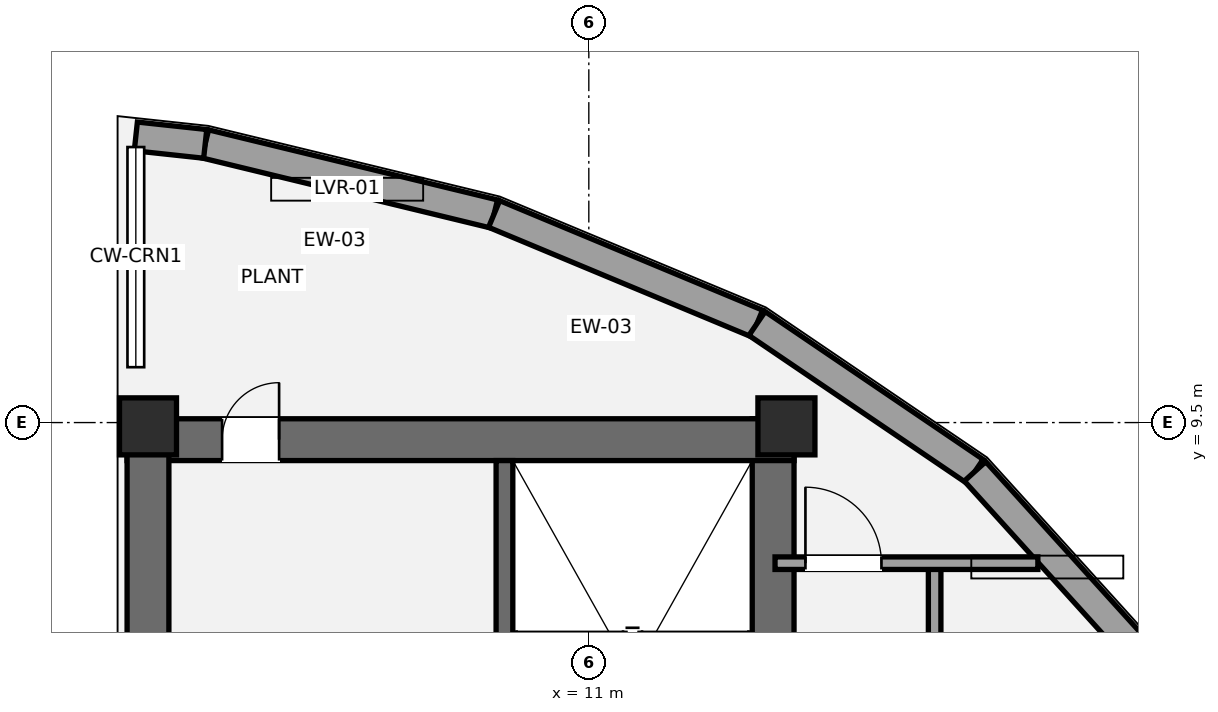
"""IFC4 building model, lengths in metres.
Left out: names, types, materials, properties, quantities, classifications, styles, units other than length and angle.
Written with IfcOpenShell. Run it as: python <this file> out.ifc"""

import sys

from ifc_helpers import new_model, si_unit, direction, frame, frame_2d, origin, origin_2d, place, context, subcontext, project, spatial, rectangle, extrude, element, fill, save


model = new_model("IFC4")
c1 = context("Model", 3, precision=1e-05, world=origin(), true_north=direction((0.0, 1.0)))
c2 = subcontext(c1, "Body", "Model", "MODEL_VIEW")
j1 = project(units=[si_unit("LENGTHUNIT", "METRE"), si_unit("PLANEANGLEUNIT", "RADIAN")], contexts=[c1])
p1 = place(None, origin())
s1 = spatial("IfcSite", under=j1, at=p1, CompositionType="ELEMENT")
p2 = place(p1, origin())
s2 = spatial("IfcBuilding", under=s1, at=p2, CompositionType="ELEMENT")
p3 = place(p2, frame((0.0, 0.0, 280.6)))
s3 = spatial("IfcBuildingStorey", under=s2, at=p3, CompositionType="ELEMENT", Elevation=280.6)
p4 = place(p3, frame((13.425, 1.3, 0.0), z_axis=(0.0, 0.0, 1.0), x_axis=(0.0, 1.0, 0.0)))
e1 = element("IfcWall", 1, at=p4, inside=s3, PredefinedType="SHEAR", context=c2, shape_type="SweptSolid", body=[
    extrude(rectangle(XDim=8.25, YDim=0.55, at=frame_2d((4.125, 0.0))), origin(), (0.0, 0.0, 1.0), 3.8),
])
p5 = place(p3, frame((4.925, 9.275, 0.0), z_axis=(0.0, 0.0, 1.0), x_axis=(1.0, 0.0, 0.0)))
e2 = element("IfcWall", 2, at=p5, inside=s3, PredefinedType="SHEAR", context=c2, shape_type="SweptSolid", body=[
    extrude(rectangle(XDim=8.775, YDim=0.55, at=frame_2d((4.387, 0.0))), origin(), (0.0, 0.0, 1.0), 3.8),
])
p6 = place(p5, frame((1.25, 0.0, 0.0)))
e3 = element("IfcOpeningElement", 3, at=p6, cuts=e2, PredefinedType="OPENING", context=c2, shape_type="SweptSolid", body=[
    extrude(rectangle(XDim=0.75, YDim=2.1, at=frame_2d((0.375, 1.05))), frame((0.0, 0.285, 0.0), z_axis=(0.0, -1.0, 0.0), x_axis=(1.0, 0.0, 0.0)), (0.0, 0.0, 1.0), 0.57),
])
p7 = place(p3, frame((5.2, 1.3, 0.0), z_axis=(0.0, 0.0, 1.0), x_axis=(0.0, 1.0, 0.0)))
e4 = element("IfcWall", 4, at=p7, inside=s3, PredefinedType="SHEAR", context=c2, shape_type="SweptSolid", body=[
    extrude(rectangle(XDim=8.25, YDim=0.55, at=frame_2d((4.125, 0.0))), origin(), (0.0, 0.0, 1.0), 3.8),
])
p8 = place(p3, frame((9.89, 1.85, 0.0), z_axis=(0.0, 0.0, 1.0), x_axis=(0.0, 1.0, 0.0)))
e5 = element("IfcWall", 5, at=p8, inside=s3, PredefinedType="SHEAR", context=c2, shape_type="SweptSolid", body=[
    extrude(rectangle(XDim=7.15, YDim=0.22, at=frame_2d((3.575, 0.0))), origin(), (0.0, 0.0, 1.0), 3.8),
])
for number, where, z_axis, x_axis in (
    (6, (5.2, 9.45, 0.0), (0.0, 0.0, 1.0), (1.0, 0.0, 0.0)),
    (7, (13.6, 9.45, 0.0), (0.0, 0.0, 1.0), (1.0, 0.0, 0.0)),
):
    element("IfcColumn", number, at=place(p3, frame(where, z_axis=z_axis, x_axis=x_axis)), inside=s3, PredefinedType="PILASTER", context=c2, shape_type="SweptSolid", body=[
        extrude(rectangle(XDim=0.75, YDim=0.75, at=origin_2d()), origin(), (0.0, 0.0, 1.0), 3.8),
    ])
p9 = place(p3, frame((9.754, 12.245, 0.0), z_axis=(0.0, 0.0, 1.0), x_axis=(-0.971829314356, 0.235685773347, 0.0)))
e8 = element("IfcWall", 8, at=p9, inside=s3, PredefinedType="ELEMENTEDWALL", context=c2, shape_type="SweptSolid", body=[
    extrude(rectangle(XDim=3.911, YDim=0.38, at=frame_2d((1.956, 0.0))), origin(), (0.0, 0.0, 1.0), 2.97),
])
p10 = place(p3, frame((13.213, 10.804, 0.0), z_axis=(0.0, 0.0, 1.0), x_axis=(-0.923107762436, 0.384541361794, 0.0)))
e9 = element("IfcWall", 9, at=p10, inside=s3, PredefinedType="ELEMENTEDWALL", context=c2, shape_type="SweptSolid", body=[
    extrude(rectangle(XDim=3.747, YDim=0.38, at=frame_2d((1.874, 0.0))), origin(), (0.0, 0.0, 1.0), 2.97),
])
p11 = place(p3, frame((16.082, 8.858, 0.0), z_axis=(0.0, 0.0, 1.0), x_axis=(-0.827591474152, 0.561330875608, 0.0)))
e10 = element("IfcWall", 10, at=p11, inside=s3, PredefinedType="ELEMENTEDWALL", context=c2, shape_type="SweptSolid", body=[
    extrude(rectangle(XDim=3.466, YDim=0.38, at=frame_2d((1.733, 0.0))), origin(), (0.0, 0.0, 1.0), 2.97),
])
p12 = place(p3, frame((18.191, 6.529, 0.0), z_axis=(0.0, 0.0, 1.0), x_axis=(-0.671159432859, 0.741313034881, 0.0)))
e11 = element("IfcWall", 11, at=p12, inside=s3, PredefinedType="ELEMENTEDWALL", context=c2, shape_type="SweptSolid", body=[
    extrude(rectangle(XDim=3.143, YDim=0.38, at=frame_2d((1.571, 0.0))), origin(), (0.0, 0.0, 1.0), 2.97),
])
p13 = place(p3, frame((5.953, 13.167, 0.0), z_axis=(0.0, 0.0, 1.0), x_axis=(-0.994241555016, 0.107162168139, 0.0)))
e12 = element("IfcWall", 12, at=p13, inside=s3, PredefinedType="ELEMENTEDWALL", context=c2, shape_type="SweptSolid", body=[
    extrude(rectangle(XDim=0.918, YDim=0.38, at=frame_2d((0.459, 0.0))), origin(), (0.0, 0.0, 1.0), 2.97),
])
p14 = place(p3, frame((15.55, -7.05, 0.0), z_axis=(0.0, 0.0, 1.0), x_axis=(0.0, 1.0, 0.0)))
e13 = element("IfcWall", 13, at=p14, inside=s3, PredefinedType="PARTITIONING", context=c2, shape_type="SweptSolid", body=[
    extrude(rectangle(XDim=14.7, YDim=0.165, at=frame_2d((7.35, 0.0))), origin(), (0.0, 0.0, 1.0), 2.987),
])
p15 = place(p14, frame((1.8, 0.0, 0.0)))
e14 = element("IfcOpeningElement", 14, at=p15, cuts=e13, PredefinedType="OPENING", context=c2, shape_type="SweptSolid", body=[
    extrude(rectangle(XDim=1.0, YDim=2.15, at=frame_2d((0.5, 1.075))), frame((0.0, 0.093, 0.0), z_axis=(0.0, -1.0, 0.0), x_axis=(1.0, 0.0, 0.0)), (0.0, 0.0, 1.0), 0.185),
])
p16 = place(p14, frame((7.28, 0.0, 0.0)))
e15 = element("IfcOpeningElement", 15, at=p16, cuts=e13, PredefinedType="OPENING", context=c2, shape_type="SweptSolid", body=[
    extrude(rectangle(XDim=1.0, YDim=2.15, at=frame_2d((0.5, 1.075))), frame((0.0, 0.093, 0.0), z_axis=(0.0, -1.0, 0.0), x_axis=(1.0, 0.0, 0.0)), (0.0, 0.0, 1.0), 0.185),
])
p17 = place(p14, frame((11.6, 0.0, 0.0)))
e16 = element("IfcOpeningElement", 16, at=p17, cuts=e13, PredefinedType="OPENING", context=c2, shape_type="SweptSolid", body=[
    extrude(rectangle(XDim=1.0, YDim=2.15, at=frame_2d((0.5, 1.075))), frame((0.0, 0.093, 0.0), z_axis=(0.0, -1.0, 0.0), x_axis=(1.0, 0.0, 0.0)), (0.0, 0.0, 1.0), 0.185),
])
p18 = place(p3, frame((13.45, 7.65, 0.0), z_axis=(0.0, 0.0, 1.0), x_axis=(1.0, 0.0, 0.0)))
e17 = element("IfcWall", 17, at=p18, inside=s3, PredefinedType="PARTITIONING", context=c2, shape_type="SweptSolid", body=[
    extrude(rectangle(XDim=3.458, YDim=0.165, at=frame_2d((1.729, 0.0))), origin(), (0.0, 0.0, 1.0), 2.968),
])
p19 = place(p18, frame((0.4, 0.0, 0.0)))
e18 = element("IfcOpeningElement", 18, at=p19, cuts=e17, PredefinedType="OPENING", context=c2, shape_type="SweptSolid", body=[
    extrude(rectangle(XDim=1.0, YDim=2.15, at=frame_2d((0.5, 1.075))), frame((0.0, 0.093, 0.0), z_axis=(0.0, -1.0, 0.0), x_axis=(1.0, 0.0, 0.0)), (0.0, 0.0, 1.0), 0.185),
])
p20 = place(p6, origin())
e19 = element("IfcDoor", 19, at=p20, inside=s3, OperationType="SINGLE_SWING_RIGHT", PredefinedType="DOOR", context=c2, shape_type="SweptSolid", body=[
    extrude(rectangle(XDim=0.75, YDim=2.1, at=frame_2d((0.375, 1.05))), frame((0.0, 0.025, 0.0), z_axis=(0.0, -1.0, 0.0), x_axis=(1.0, 0.0, 0.0)), (0.0, 0.0, 1.0), 0.05),
])
fill(e3, e19)
p21 = place(p19, origin())
e20 = element("IfcDoor", 20, at=p21, inside=s3, OperationType="SINGLE_SWING_LEFT", PredefinedType="DOOR", context=c2, shape_type="SweptSolid", body=[
    extrude(rectangle(XDim=1.0, YDim=2.15, at=frame_2d((0.5, 1.075))), frame((0.0, 0.025, 0.0), z_axis=(0.0, -1.0, 0.0), x_axis=(1.0, 0.0, 0.0)), (0.0, 0.0, 1.0), 0.05),
])
fill(e18, e20)
save(model, sys.argv[1])
